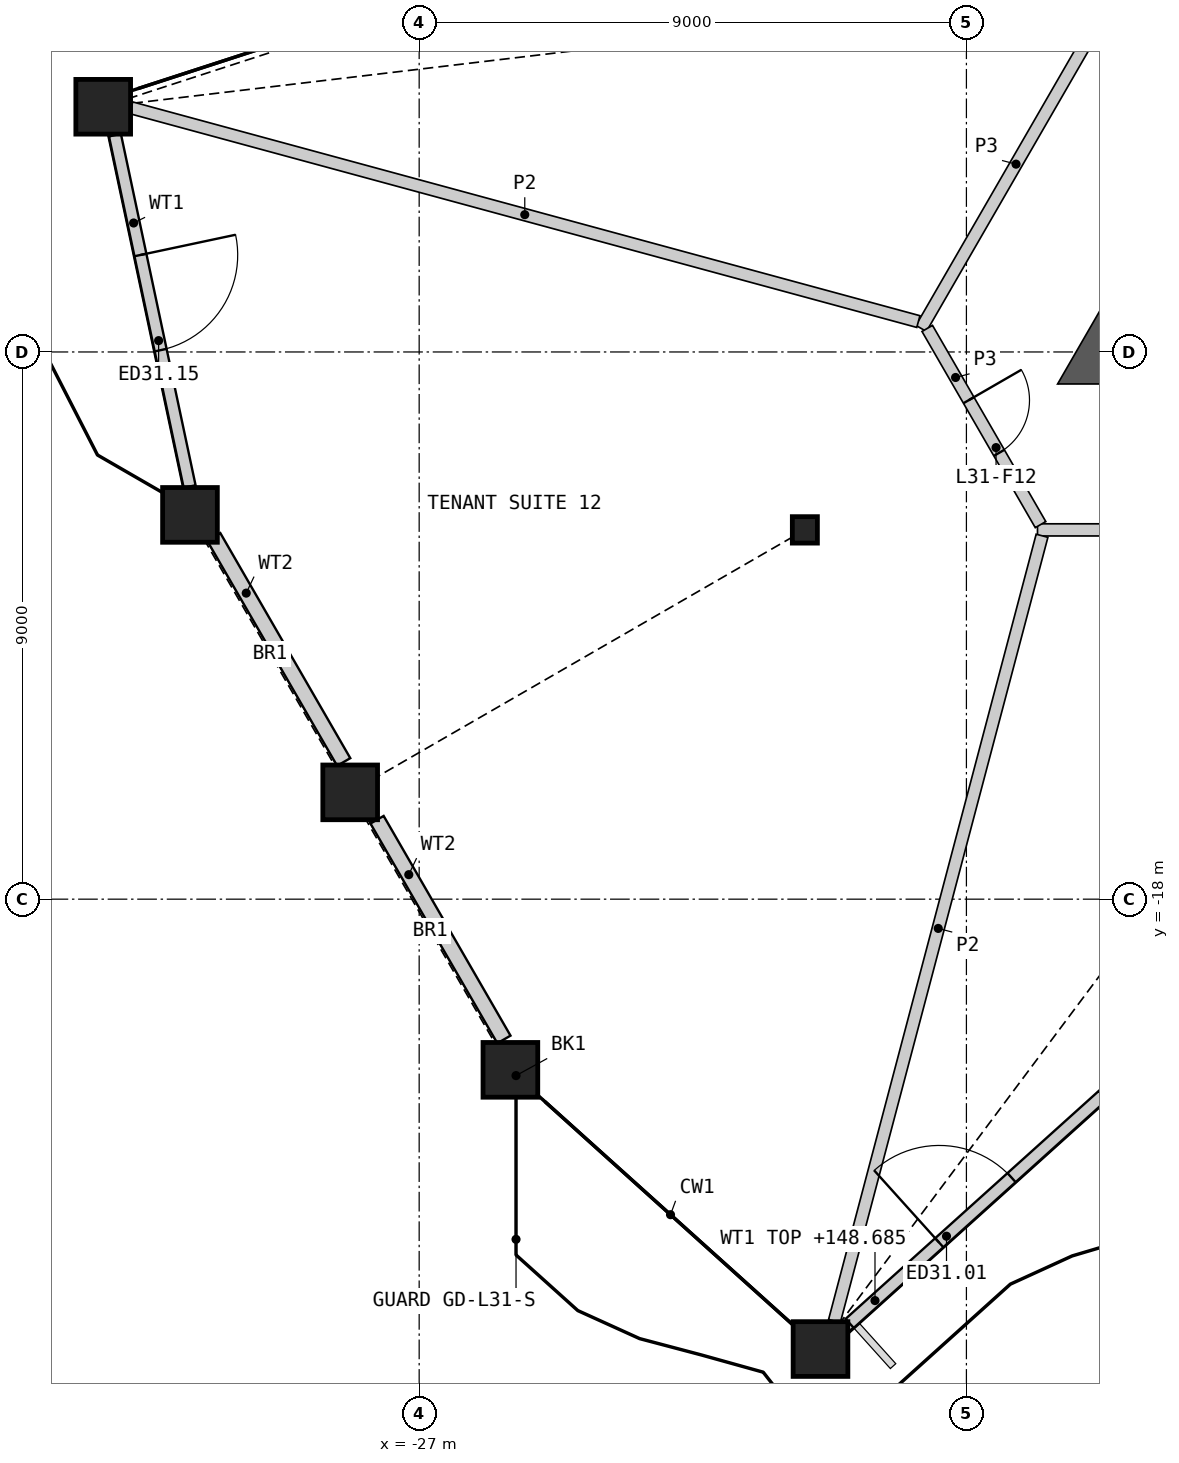
"""IFC4 building model, lengths in metres.
Left out: names, types, materials, properties, quantities, classifications, styles, units other than length and angle.
Written with IfcOpenShell. Run it as: python <this file> out.ifc"""

import sys

from ifc_helpers import new_model, si_unit, direction, frame, frame_2d, origin, origin_2d, place, context, subcontext, project, spatial, polyline, rectangle, hollow_rectangle, i_section, outline, extrude, element, fill, save


model = new_model("IFC4")
c1 = context("Model", 3, precision=1e-05, world=origin(), true_north=direction((0.0, 1.0)))
c2 = subcontext(c1, "Body", "Model", "MODEL_VIEW")
j1 = project(units=[si_unit("LENGTHUNIT", "METRE"), si_unit("PLANEANGLEUNIT", "RADIAN")], contexts=[c1])
p1 = place(None, origin())
s1 = spatial("IfcSite", under=j1, at=p1, CompositionType="ELEMENT")
p2 = place(p1, origin())
s2 = spatial("IfcBuilding", under=s1, at=p2, CompositionType="ELEMENT")
p3 = place(p2, frame((0.0, 0.0, 145.8)))
s3 = spatial("IfcBuildingStorey", under=s2, at=p3, CompositionType="ELEMENT", Elevation=145.8)
for number, where, z_axis, x_axis in (
    (1, (-25.5, -20.807, 0.0), (0.0, 0.0, 1.0), (1.0, 0.0, 0.0)),
    (2, (-20.4, -25.399, 0.0), (0.0, 0.0, 1.0), (1.0, 0.0, 0.0)),
    (3, (-32.196, -4.967, 0.0), (0.0, 0.0, 1.0), (1.0, 0.0, 0.0)),
    (4, (-30.769, -11.68, 0.0), (0.0, 0.0, 1.0), (1.0, 0.0, 0.0)),
    (5, (-28.135, -16.243, 0.0), (0.0, 0.0, 1.0), (1.0, 0.0, 0.0)),
):
    element("IfcColumn", number, at=place(p3, frame(where, z_axis=z_axis, x_axis=x_axis)), inside=s3, PredefinedType="COLUMN", context=c2, shape_type="SweptSolid", body=[
        extrude(hollow_rectangle(XDim=0.9, YDim=0.9, WallThickness=0.06, at=origin_2d()), origin(), (0.0, 0.0, 1.0), 4.2),
    ])
p4 = place(p3, frame((-20.657, -11.926, 0.0), z_axis=(0.0, 0.0, 1.0), x_axis=(1.0, 0.0, 0.0)))
e6 = element("IfcColumn", 6, at=p4, inside=s3, PredefinedType="COLUMN", context=c2, shape_type="SweptSolid", body=[
    extrude(i_section(OverallWidth=0.412, OverallDepth=0.435, WebThickness=0.036, FlangeThickness=0.057, at=origin_2d()), origin(), (0.0, 0.0, 1.0), 4.2),
])
p5 = place(p3, frame((-19.92, -24.977, 0.0), z_axis=(0.0, 0.0, 1.0), x_axis=(0.743146822591, 0.669128388333, 0.0)))
e7 = element("IfcWall", 7, at=p5, inside=s3, PredefinedType="SOLIDWALL", context=c2, shape_type="SweptSolid", body=[
    extrude(rectangle(XDim=5.604, YDim=0.2, at=frame_2d((2.802, 0.0))), origin(), (0.0, 0.0, 1.0), 2.885),
])
p6 = place(p5, frame((1.983, 0.0, 0.0)))
e8 = element("IfcOpeningElement", 8, at=p6, cuts=e7, PredefinedType="OPENING", context=c2, shape_type="SweptSolid", body=[
    extrude(rectangle(XDim=1.6, YDim=2.4, at=frame_2d((0.8, 1.2))), frame((0.0, 0.11, 0.0), z_axis=(0.0, -1.0, 0.0), x_axis=(1.0, 0.0, 0.0)), (0.0, 0.0, 1.0), 0.22),
])
p7 = place(p3, frame((-32.003, -5.434, 0.0), z_axis=(0.0, 0.0, 1.0), x_axis=(0.207886430801, -0.978152969575, 0.0)))
e9 = element("IfcWall", 9, at=p7, inside=s3, PredefinedType="SOLIDWALL", context=c2, shape_type="SweptSolid", body=[
    extrude(rectangle(XDim=5.908, YDim=0.2, at=frame_2d((2.954, 0.0))), origin(), (0.0, 0.0, 1.0), 3.189),
])
p8 = place(p7, frame((2.015, 0.0, 0.0)))
e10 = element("IfcOpeningElement", 10, at=p8, cuts=e9, PredefinedType="OPENING", context=c2, shape_type="SweptSolid", body=[
    extrude(rectangle(XDim=1.6, YDim=2.4, at=frame_2d((0.8, 1.2))), frame((0.0, 0.11, 0.0), z_axis=(0.0, -1.0, 0.0), x_axis=(1.0, 0.0, 0.0)), (0.0, 0.0, 1.0), 0.22),
])
p9 = place(p3, frame((-30.379, -12.041, 0.0), z_axis=(0.0, 0.0, 1.0), x_axis=(0.499995966399, -0.866027732573, 0.0)))
e11 = element("IfcWall", 11, at=p9, inside=s3, PredefinedType="SOLIDWALL", context=c2, shape_type="SweptSolid", body=[
    extrude(rectangle(XDim=4.275, YDim=0.25, at=frame_2d((2.138, 0.0))), origin(), (0.0, 0.0, 1.0), 3.189),
])
p10 = place(p3, frame((-27.692, -16.693, 0.0), z_axis=(0.0, 0.0, 1.0), x_axis=(0.500002690545, -0.866023850392, 0.0)))
e12 = element("IfcWall", 12, at=p10, inside=s3, PredefinedType="SOLIDWALL", context=c2, shape_type="SweptSolid", body=[
    extrude(rectangle(XDim=4.173, YDim=0.25, at=frame_2d((2.086, 0.0))), origin(), (0.0, 0.0, 1.0), 3.189),
])
p11 = place(p3, origin())
e13 = element("IfcWall", 13, at=p11, inside=s3, PredefinedType="SHEAR", context=c2, shape_type="SweptSolid", body=[
    extrude(outline(polyline([(-14.941, -8.626), (-14.941, -9.526), (-16.5, -9.526), (-15.721, -8.176), (-14.941, -8.626)])), origin(), (0.0, 0.0, 1.0), 3.8),
])
p12 = place(p3, frame((-16.831, -11.926, 0.0), z_axis=(0.0, 0.0, 1.0), x_axis=(1.0, 0.0, 0.0)))
e14 = element("IfcWall", 14, at=p12, inside=s3, PredefinedType="PARTITIONING", context=c2, shape_type="SweptSolid", body=[
    extrude(rectangle(XDim=6.275, YDim=0.2, at=frame_2d((3.137, 0.0))), origin(), (0.0, 0.0, 1.0), 3.8),
])
p13 = place(p12, frame((2.289, 0.0, 0.0)))
e15 = element("IfcOpeningElement", 15, at=p13, cuts=e14, PredefinedType="OPENING", context=c2, shape_type="SweptSolid", body=[
    extrude(rectangle(XDim=1.8, YDim=2.1, at=frame_2d((0.9, 1.05))), frame((0.0, 0.11, 0.0), z_axis=(0.0, -1.0, 0.0), x_axis=(1.0, 0.0, 0.0)), (0.0, 0.0, 1.0), 0.22),
])
p14 = place(p3, frame((-18.744, -8.613, 0.0), z_axis=(0.0, 0.0, 1.0), x_axis=(0.499997920671, 0.866026604282, 0.0)))
e16 = element("IfcWall", 16, at=p14, inside=s3, PredefinedType="PARTITIONING", context=c2, shape_type="SweptSolid", body=[
    extrude(rectangle(XDim=6.24, YDim=0.2, at=frame_2d((3.12, 0.0))), origin(), (0.0, 0.0, 1.0), 3.8),
])
p15 = place(p3, frame((-18.644, -8.613, 0.0), z_axis=(0.0, 0.0, 1.0), x_axis=(0.499958791762, -0.866049194065, 0.0)))
e17 = element("IfcWall", 17, at=p15, inside=s3, PredefinedType="PARTITIONING", context=c2, shape_type="SweptSolid", body=[
    extrude(rectangle(XDim=3.726, YDim=0.2, at=frame_2d((1.863, 0.0))), origin(), (0.0, 0.0, 1.0), 3.8),
])
p16 = place(p15, frame((1.363, 0.0, 0.0)))
e18 = element("IfcOpeningElement", 18, at=p16, cuts=e17, PredefinedType="OPENING", context=c2, shape_type="SweptSolid", body=[
    extrude(rectangle(XDim=1.0, YDim=2.1, at=frame_2d((0.5, 1.05))), frame((0.0, 0.11, 0.0), z_axis=(0.0, -1.0, 0.0), x_axis=(1.0, 0.0, 0.0)), (0.0, 0.0, 1.0), 0.22),
])
p17 = place(p3, frame((-31.736, -4.984, 0.0), z_axis=(0.0, 0.0, 1.0), x_axis=(0.965038802525, -0.262107057556, 0.0)))
e19 = element("IfcWall", 19, at=p17, inside=s3, PredefinedType="PARTITIONING", context=c2, shape_type="SweptSolid", body=[
    extrude(rectangle(XDim=13.415, YDim=0.2, at=frame_2d((6.708, 0.0))), origin(), (0.0, 0.0, 1.0), 2.885),
])
p18 = place(p3, frame((-20.17, -24.939, 0.0), z_axis=(0.0, 0.0, 1.0), x_axis=(0.25554647156, 0.966796773305, 0.0)))
e20 = element("IfcWall", 20, at=p18, inside=s3, PredefinedType="PARTITIONING", context=c2, shape_type="SweptSolid", body=[
    extrude(rectangle(XDim=13.36, YDim=0.2, at=frame_2d((6.68, 0.0))), origin(), (0.0, 0.0, 1.0), 2.885),
])
p19 = place(p6, origin())
e21 = element("IfcDoor", 21, at=p19, inside=s3, OperationType="DOUBLE_DOOR_SINGLE_SWING", PredefinedType="DOOR", context=c2, shape_type="SweptSolid", body=[
    extrude(rectangle(XDim=1.6, YDim=2.4, at=frame_2d((0.8, 1.2))), frame((0.0, 0.025, 0.0), z_axis=(0.0, -1.0, 0.0), x_axis=(1.0, 0.0, 0.0)), (0.0, 0.0, 1.0), 0.05),
])
fill(e8, e21)
p20 = place(p8, origin())
e22 = element("IfcDoor", 22, at=p20, inside=s3, OperationType="DOUBLE_DOOR_SINGLE_SWING", PredefinedType="DOOR", context=c2, shape_type="SweptSolid", body=[
    extrude(rectangle(XDim=1.6, YDim=2.4, at=frame_2d((0.8, 1.2))), frame((0.0, 0.025, 0.0), z_axis=(0.0, -1.0, 0.0), x_axis=(1.0, 0.0, 0.0)), (0.0, 0.0, 1.0), 0.05),
])
fill(e10, e22)
p21 = place(p16, origin())
e23 = element("IfcDoor", 23, at=p21, inside=s3, OperationType="SINGLE_SWING_LEFT", PredefinedType="DOOR", context=c2, shape_type="SweptSolid", body=[
    extrude(rectangle(XDim=1.0, YDim=2.1, at=frame_2d((0.5, 1.05))), frame((0.0, 0.025, 0.0), z_axis=(0.0, -1.0, 0.0), x_axis=(1.0, 0.0, 0.0)), (0.0, 0.0, 1.0), 0.05),
])
fill(e18, e23)
save(model, sys.argv[1])
